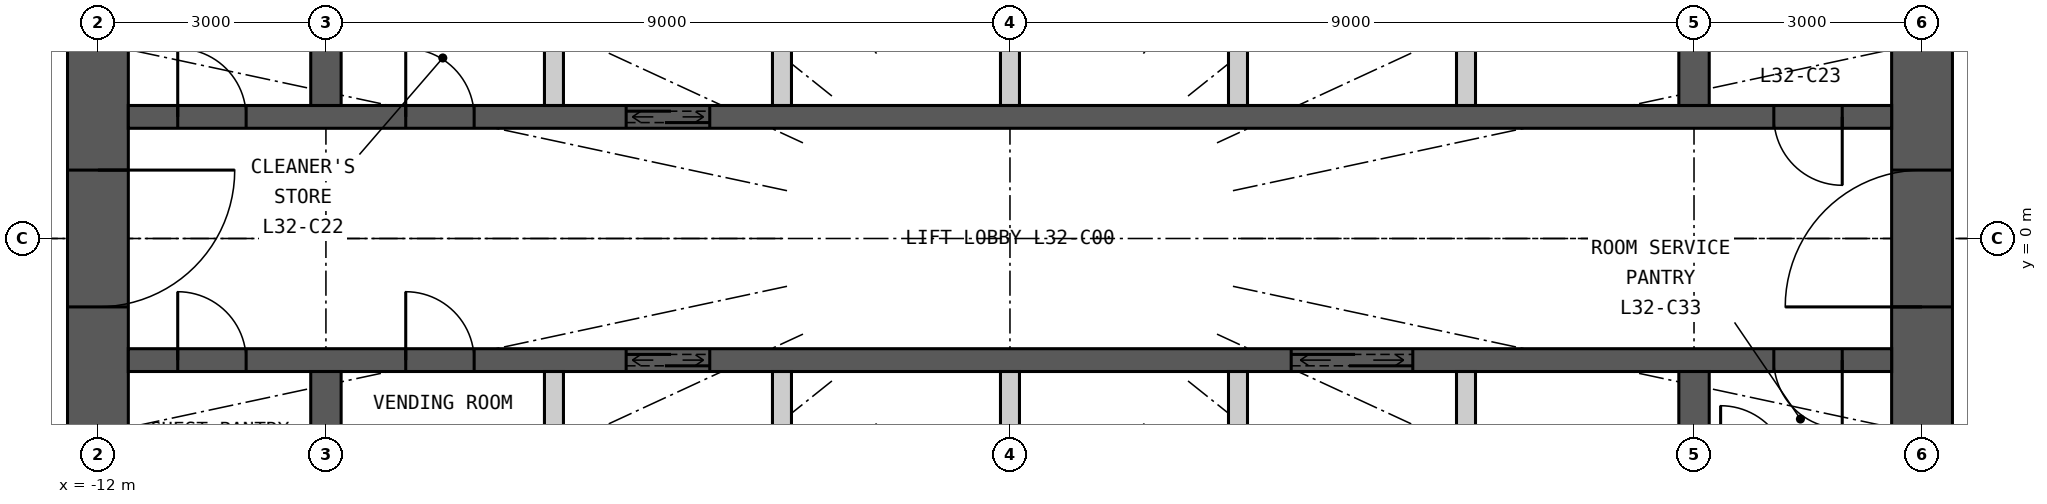
"""IFC4 building model, lengths in metres.
Left out: names, types, materials, properties, quantities, classifications, styles, units other than length and angle.
Written with IfcOpenShell. Run it as: python <this file> out.ifc"""

import sys

from ifc_helpers import new_model, si_unit, direction, frame, frame_2d, origin, place, context, subcontext, project, spatial, rectangle, extrude, element, fill, save


model = new_model("IFC4")
c1 = context("Model", 3, precision=1e-05, world=origin(), true_north=direction((0.0, 1.0)))
c2 = subcontext(c1, "Body", "Model", "MODEL_VIEW")
j1 = project(units=[si_unit("LENGTHUNIT", "METRE"), si_unit("PLANEANGLEUNIT", "RADIAN")], contexts=[c1])
p1 = place(None, origin())
s1 = spatial("IfcSite", under=j1, at=p1, CompositionType="ELEMENT")
p2 = place(p1, origin())
s2 = spatial("IfcBuilding", under=s1, at=p2, CompositionType="ELEMENT")
p3 = place(p2, frame((0.0, 0.0, 125.4)))
s3 = spatial("IfcBuildingStorey", under=s2, at=p3, CompositionType="ELEMENT", Elevation=125.4)
p4 = place(p3, frame((12.0, -7.6, 0.0), z_axis=(0.0, 0.0, 1.0), x_axis=(0.0, 1.0, 0.0)))
e1 = element("IfcWall", 1, at=p4, inside=s3, PredefinedType="SHEAR", context=c2, shape_type="SweptSolid", body=[
    extrude(rectangle(XDim=15.2, YDim=0.8, at=frame_2d((7.6, 0.0))), origin(), (0.0, 0.0, 1.0), 3.3),
])
p5 = place(p4, frame((6.7, 0.0, 0.0)))
e2 = element("IfcOpeningElement", 2, at=p5, cuts=e1, PredefinedType="OPENING", context=c2, shape_type="SweptSolid", body=[
    extrude(rectangle(XDim=1.8, YDim=2.2, at=frame_2d((0.9, 1.1))), frame((0.0, 0.41, 0.0), z_axis=(0.0, -1.0, 0.0), x_axis=(1.0, 0.0, 0.0)), (0.0, 0.0, 1.0), 0.82),
])
p6 = place(p3, frame((-12.0, 7.6, 0.0), z_axis=(0.0, 0.0, 1.0), x_axis=(0.0, -1.0, 0.0)))
e3 = element("IfcWall", 3, at=p6, inside=s3, PredefinedType="SHEAR", context=c2, shape_type="SweptSolid", body=[
    extrude(rectangle(XDim=15.2, YDim=0.8, at=frame_2d((7.6, 0.0))), origin(), (0.0, 0.0, 1.0), 3.3),
])
p7 = place(p6, frame((6.7, 0.0, 0.0)))
e4 = element("IfcOpeningElement", 4, at=p7, cuts=e3, PredefinedType="OPENING", context=c2, shape_type="SweptSolid", body=[
    extrude(rectangle(XDim=1.8, YDim=2.2, at=frame_2d((0.9, 1.1))), frame((0.0, 0.41, 0.0), z_axis=(0.0, -1.0, 0.0), x_axis=(1.0, 0.0, 0.0)), (0.0, 0.0, 1.0), 0.82),
])
p8 = place(p3, frame((-11.6, 1.6, 0.0), z_axis=(0.0, 0.0, 1.0), x_axis=(1.0, 0.0, 0.0)))
e5 = element("IfcWall", 5, at=p8, inside=s3, PredefinedType="SHEAR", context=c2, shape_type="SweptSolid", body=[
    extrude(rectangle(XDim=23.2, YDim=0.3, at=frame_2d((11.6, 0.0))), origin(), (0.0, 0.0, 1.0), 3.3),
])
p9 = place(p8, frame((6.55, 0.0, 0.0)))
e6 = element("IfcOpeningElement", 6, at=p9, cuts=e5, PredefinedType="OPENING", context=c2, shape_type="SweptSolid", body=[
    extrude(rectangle(XDim=1.1, YDim=2.2, at=frame_2d((0.55, 1.1))), frame((0.0, 0.16, 0.0), z_axis=(0.0, -1.0, 0.0), x_axis=(1.0, 0.0, 0.0)), (0.0, 0.0, 1.0), 0.32),
])
p10 = place(p8, frame((0.65, 0.0, 0.0)))
e7 = element("IfcOpeningElement", 7, at=p10, cuts=e5, PredefinedType="OPENING", context=c2, shape_type="SweptSolid", body=[
    extrude(rectangle(XDim=0.9, YDim=2.2, at=frame_2d((0.45, 1.1))), frame((0.0, 0.16, 0.0), z_axis=(0.0, -1.0, 0.0), x_axis=(1.0, 0.0, 0.0)), (0.0, 0.0, 1.0), 0.32),
])
p11 = place(p8, frame((3.65, 0.0, 0.0)))
e8 = element("IfcOpeningElement", 8, at=p11, cuts=e5, PredefinedType="OPENING", context=c2, shape_type="SweptSolid", body=[
    extrude(rectangle(XDim=0.9, YDim=2.2, at=frame_2d((0.45, 1.1))), frame((0.0, 0.16, 0.0), z_axis=(0.0, -1.0, 0.0), x_axis=(1.0, 0.0, 0.0)), (0.0, 0.0, 1.0), 0.32),
])
p12 = place(p8, frame((21.65, 0.0, 0.0)))
e9 = element("IfcOpeningElement", 9, at=p12, cuts=e5, PredefinedType="OPENING", context=c2, shape_type="SweptSolid", body=[
    extrude(rectangle(XDim=0.9, YDim=2.2, at=frame_2d((0.45, 1.1))), frame((0.0, 0.16, 0.0), z_axis=(0.0, -1.0, 0.0), x_axis=(1.0, 0.0, 0.0)), (0.0, 0.0, 1.0), 0.32),
])
p13 = place(p3, frame((-11.6, -1.6, 0.0), z_axis=(0.0, 0.0, 1.0), x_axis=(1.0, 0.0, 0.0)))
e10 = element("IfcWall", 10, at=p13, inside=s3, PredefinedType="SHEAR", context=c2, shape_type="SweptSolid", body=[
    extrude(rectangle(XDim=23.2, YDim=0.3, at=frame_2d((11.6, 0.0))), origin(), (0.0, 0.0, 1.0), 3.3),
])
p14 = place(p13, frame((6.55, 0.0, 0.0)))
e11 = element("IfcOpeningElement", 11, at=p14, cuts=e10, PredefinedType="OPENING", context=c2, shape_type="SweptSolid", body=[
    extrude(rectangle(XDim=1.1, YDim=2.2, at=frame_2d((0.55, 1.1))), frame((0.0, 0.16, 0.0), z_axis=(0.0, -1.0, 0.0), x_axis=(1.0, 0.0, 0.0)), (0.0, 0.0, 1.0), 0.32),
])
p15 = place(p13, frame((15.3, 0.0, 0.0)))
e12 = element("IfcOpeningElement", 12, at=p15, cuts=e10, PredefinedType="OPENING", context=c2, shape_type="SweptSolid", body=[
    extrude(rectangle(XDim=1.6, YDim=2.4, at=frame_2d((0.8, 1.2))), frame((0.0, 0.16, 0.0), z_axis=(0.0, -1.0, 0.0), x_axis=(1.0, 0.0, 0.0)), (0.0, 0.0, 1.0), 0.32),
])
p16 = place(p13, frame((0.65, 0.0, 0.0)))
e13 = element("IfcOpeningElement", 13, at=p16, cuts=e10, PredefinedType="OPENING", context=c2, shape_type="SweptSolid", body=[
    extrude(rectangle(XDim=0.9, YDim=2.2, at=frame_2d((0.45, 1.1))), frame((0.0, 0.16, 0.0), z_axis=(0.0, -1.0, 0.0), x_axis=(1.0, 0.0, 0.0)), (0.0, 0.0, 1.0), 0.32),
])
p17 = place(p13, frame((3.65, 0.0, 0.0)))
e14 = element("IfcOpeningElement", 14, at=p17, cuts=e10, PredefinedType="OPENING", context=c2, shape_type="SweptSolid", body=[
    extrude(rectangle(XDim=0.9, YDim=2.2, at=frame_2d((0.45, 1.1))), frame((0.0, 0.16, 0.0), z_axis=(0.0, -1.0, 0.0), x_axis=(1.0, 0.0, 0.0)), (0.0, 0.0, 1.0), 0.32),
])
p18 = place(p13, frame((21.65, 0.0, 0.0)))
e15 = element("IfcOpeningElement", 15, at=p18, cuts=e10, PredefinedType="OPENING", context=c2, shape_type="SweptSolid", body=[
    extrude(rectangle(XDim=0.9, YDim=2.2, at=frame_2d((0.45, 1.1))), frame((0.0, 0.16, 0.0), z_axis=(0.0, -1.0, 0.0), x_axis=(1.0, 0.0, 0.0)), (0.0, 0.0, 1.0), 0.32),
])
for number, where, z_axis, x_axis in (
    (16, (-9.0, 1.75, 0.0), (0.0, 0.0, 1.0), (0.0, 1.0, 0.0)),
    (17, (-9.0, -4.1, 0.0), (0.0, 0.0, 1.0), (0.0, 1.0, 0.0)),
    (18, (9.0, 1.75, 0.0), (0.0, 0.0, 1.0), (0.0, 1.0, 0.0)),
    (19, (9.0, -4.1, 0.0), (0.0, 0.0, 1.0), (0.0, 1.0, 0.0)),
):
    element("IfcWall", number, at=place(p3, frame(where, z_axis=z_axis, x_axis=x_axis)), inside=s3, PredefinedType="SHEAR", context=c2, shape_type="SweptSolid", body=[
        extrude(rectangle(XDim=2.35, YDim=0.4, at=frame_2d((1.175, 0.0))), origin(), (0.0, 0.0, 1.0), 3.3),
    ])
for number, where, z_axis, x_axis in (
    (20, (-6.0, 1.75, 0.0), (0.0, 0.0, 1.0), (0.0, 1.0, 0.0)),
    (21, (-3.0, 1.75, 0.0), (0.0, 0.0, 1.0), (0.0, 1.0, 0.0)),
    (22, (0.0, 1.75, 0.0), (0.0, 0.0, 1.0), (0.0, 1.0, 0.0)),
    (23, (3.0, 1.75, 0.0), (0.0, 0.0, 1.0), (0.0, 1.0, 0.0)),
    (24, (6.0, 1.75, 0.0), (0.0, 0.0, 1.0), (0.0, 1.0, 0.0)),
    (25, (-6.0, -4.1, 0.0), (0.0, 0.0, 1.0), (0.0, 1.0, 0.0)),
    (26, (-3.0, -4.1, 0.0), (0.0, 0.0, 1.0), (0.0, 1.0, 0.0)),
    (27, (0.0, -4.1, 0.0), (0.0, 0.0, 1.0), (0.0, 1.0, 0.0)),
    (28, (3.0, -4.1, 0.0), (0.0, 0.0, 1.0), (0.0, 1.0, 0.0)),
    (29, (6.0, -4.1, 0.0), (0.0, 0.0, 1.0), (0.0, 1.0, 0.0)),
):
    element("IfcWall", number, at=place(p3, frame(where, z_axis=z_axis, x_axis=x_axis)), inside=s3, PredefinedType="PARTITIONING", context=c2, shape_type="SweptSolid", body=[
        extrude(rectangle(XDim=2.35, YDim=0.25, at=frame_2d((1.175, 0.0))), origin(), (0.0, 0.0, 1.0), 3.3),
    ])
p19 = place(p9, origin())
e30 = element("IfcDoor", 30, at=p19, inside=s3, OperationType="DOUBLE_DOOR_SLIDING", PredefinedType="DOOR", context=c2, shape_type="SweptSolid", body=[
    extrude(rectangle(XDim=1.1, YDim=2.2, at=frame_2d((0.55, 1.1))), frame((0.0, 0.025, 0.0), z_axis=(0.0, -1.0, 0.0), x_axis=(1.0, 0.0, 0.0)), (0.0, 0.0, 1.0), 0.05),
])
fill(e6, e30)
p20 = place(p14, origin())
e31 = element("IfcDoor", 31, at=p20, inside=s3, OperationType="DOUBLE_DOOR_SLIDING", PredefinedType="DOOR", context=c2, shape_type="SweptSolid", body=[
    extrude(rectangle(XDim=1.1, YDim=2.2, at=frame_2d((0.55, 1.1))), frame((0.0, 0.025, 0.0), z_axis=(0.0, -1.0, 0.0), x_axis=(1.0, 0.0, 0.0)), (0.0, 0.0, 1.0), 0.05),
])
fill(e11, e31)
p21 = place(p15, origin())
e32 = element("IfcDoor", 32, at=p21, inside=s3, OperationType="DOUBLE_DOOR_SLIDING", PredefinedType="DOOR", context=c2, shape_type="SweptSolid", body=[
    extrude(rectangle(XDim=1.6, YDim=2.4, at=frame_2d((0.8, 1.2))), frame((0.0, 0.025, 0.0), z_axis=(0.0, -1.0, 0.0), x_axis=(1.0, 0.0, 0.0)), (0.0, 0.0, 1.0), 0.05),
])
fill(e12, e32)
p22 = place(p10, origin())
e33 = element("IfcDoor", 33, at=p22, inside=s3, OperationType="SINGLE_SWING_LEFT", PredefinedType="DOOR", context=c2, shape_type="SweptSolid", body=[
    extrude(rectangle(XDim=0.9, YDim=2.2, at=frame_2d((0.45, 1.1))), frame((0.0, 0.025, 0.0), z_axis=(0.0, -1.0, 0.0), x_axis=(1.0, 0.0, 0.0)), (0.0, 0.0, 1.0), 0.05),
])
fill(e7, e33)
p23 = place(p11, origin())
e34 = element("IfcDoor", 34, at=p23, inside=s3, OperationType="SINGLE_SWING_LEFT", PredefinedType="DOOR", context=c2, shape_type="SweptSolid", body=[
    extrude(rectangle(XDim=0.9, YDim=2.2, at=frame_2d((0.45, 1.1))), frame((0.0, 0.025, 0.0), z_axis=(0.0, -1.0, 0.0), x_axis=(1.0, 0.0, 0.0)), (0.0, 0.0, 1.0), 0.05),
])
fill(e8, e34)
p24 = place(p12, origin())
e35 = element("IfcDoor", 35, at=p24, inside=s3, OperationType="SINGLE_SWING_RIGHT", PredefinedType="DOOR", context=c2, shape_type="SweptSolid", body=[
    extrude(rectangle(XDim=0.9, YDim=2.2, at=frame_2d((0.45, 1.1))), frame((0.0, 0.025, 0.0), z_axis=(0.0, -1.0, 0.0), x_axis=(1.0, 0.0, 0.0)), (0.0, 0.0, 1.0), 0.05),
])
fill(e9, e35)
p25 = place(p16, origin())
e36 = element("IfcDoor", 36, at=p25, inside=s3, OperationType="SINGLE_SWING_LEFT", PredefinedType="DOOR", context=c2, shape_type="SweptSolid", body=[
    extrude(rectangle(XDim=0.9, YDim=2.2, at=frame_2d((0.45, 1.1))), frame((0.0, 0.025, 0.0), z_axis=(0.0, -1.0, 0.0), x_axis=(1.0, 0.0, 0.0)), (0.0, 0.0, 1.0), 0.05),
])
fill(e13, e36)
p26 = place(p17, origin())
e37 = element("IfcDoor", 37, at=p26, inside=s3, OperationType="SINGLE_SWING_LEFT", PredefinedType="DOOR", context=c2, shape_type="SweptSolid", body=[
    extrude(rectangle(XDim=0.9, YDim=2.2, at=frame_2d((0.45, 1.1))), frame((0.0, 0.025, 0.0), z_axis=(0.0, -1.0, 0.0), x_axis=(1.0, 0.0, 0.0)), (0.0, 0.0, 1.0), 0.05),
])
fill(e14, e37)
p27 = place(p18, origin())
e38 = element("IfcDoor", 38, at=p27, inside=s3, OperationType="SINGLE_SWING_RIGHT", PredefinedType="DOOR", context=c2, shape_type="SweptSolid", body=[
    extrude(rectangle(XDim=0.9, YDim=2.2, at=frame_2d((0.45, 1.1))), frame((0.0, 0.025, 0.0), z_axis=(0.0, -1.0, 0.0), x_axis=(1.0, 0.0, 0.0)), (0.0, 0.0, 1.0), 0.05),
])
fill(e15, e38)
p28 = place(p5, origin())
e39 = element("IfcDoor", 39, at=p28, inside=s3, OperationType="DOUBLE_DOOR_DOUBLE_SWING", PredefinedType="DOOR", context=c2, shape_type="SweptSolid", body=[
    extrude(rectangle(XDim=1.8, YDim=2.2, at=frame_2d((0.9, 1.1))), frame((0.0, 0.025, 0.0), z_axis=(0.0, -1.0, 0.0), x_axis=(1.0, 0.0, 0.0)), (0.0, 0.0, 1.0), 0.05),
])
fill(e2, e39)
p29 = place(p7, origin())
e40 = element("IfcDoor", 40, at=p29, inside=s3, OperationType="DOUBLE_DOOR_DOUBLE_SWING", PredefinedType="DOOR", context=c2, shape_type="SweptSolid", body=[
    extrude(rectangle(XDim=1.8, YDim=2.2, at=frame_2d((0.9, 1.1))), frame((0.0, 0.025, 0.0), z_axis=(0.0, -1.0, 0.0), x_axis=(1.0, 0.0, 0.0)), (0.0, 0.0, 1.0), 0.05),
])
fill(e4, e40)
save(model, sys.argv[1])
